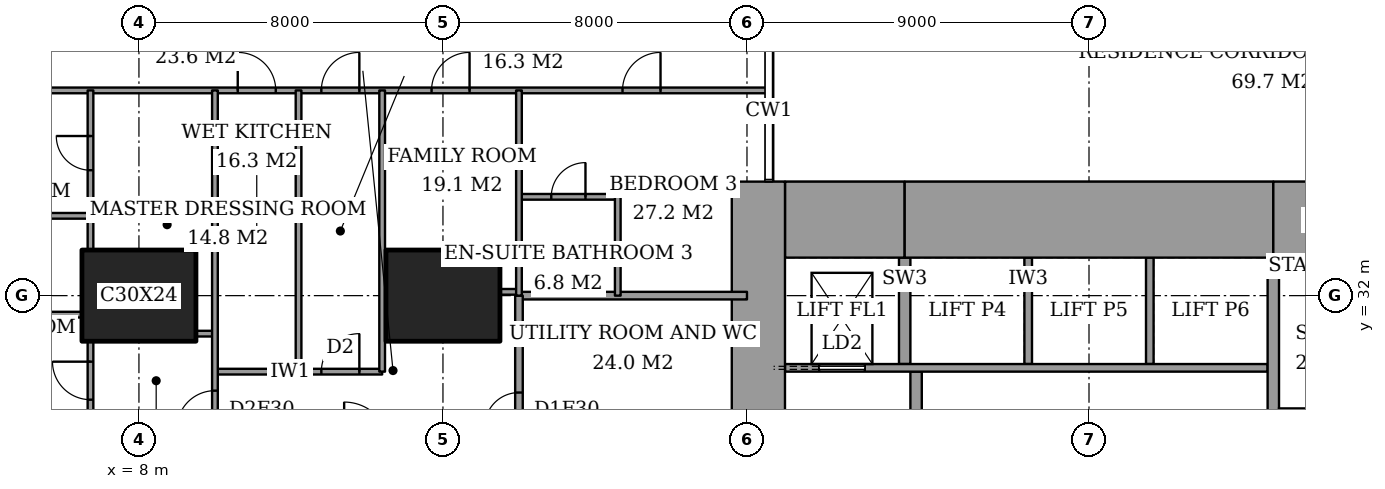
"""IFC4 building model, lengths in metres.
Left out: names, types, materials, properties, quantities, classifications, styles, units other than length and angle.
Written with IfcOpenShell. Run it as: python <this file> out.ifc"""

import sys

from ifc_helpers import new_model, si_unit, direction, frame, frame_2d, origin, origin_2d, place, context, subcontext, project, spatial, rectangle, extrude, element, fill, save


model = new_model("IFC4")
c1 = context("Model", 3, precision=1e-05, world=origin(), true_north=direction((0.0, 1.0)))
c2 = subcontext(c1, "Body", "Model", "MODEL_VIEW")
j1 = project(units=[si_unit("LENGTHUNIT", "METRE"), si_unit("PLANEANGLEUNIT", "RADIAN")], contexts=[c1])
p1 = place(None, origin())
s1 = spatial("IfcSite", under=j1, at=p1, CompositionType="ELEMENT")
p2 = place(p1, origin())
s2 = spatial("IfcBuilding", under=s1, at=p2, CompositionType="ELEMENT")
p3 = place(p2, frame((0.0, 0.0, 157.4)))
s3 = spatial("IfcBuildingStorey", under=s2, at=p3, CompositionType="ELEMENT", Elevation=157.4)
for number, where, z_axis, x_axis in (
    (1, (8.0, 32.0, 0.0), (0.0, 0.0, 1.0), (1.0, 0.0, 0.0)),
    (2, (16.0, 32.0, 0.0), (0.0, 0.0, 1.0), (1.0, 0.0, 0.0)),
):
    element("IfcColumn", number, at=place(p3, frame(where, z_axis=z_axis, x_axis=x_axis)), inside=s3, PredefinedType="COLUMN", context=c2, shape_type="SweptSolid", body=[
        extrude(rectangle(XDim=3.0, YDim=2.4, at=origin_2d()), origin(), (0.0, 0.0, 1.0), 3.6),
    ])
p4 = place(p3, frame((25.0, 34.0, 0.0), z_axis=(0.0, 0.0, 1.0), x_axis=(1.0, 0.0, 0.0)))
e3 = element("IfcWall", 3, at=p4, inside=s3, PredefinedType="SHEAR", context=c2, shape_type="SweptSolid", body=[
    extrude(rectangle(XDim=3.15, YDim=2.0, at=frame_2d((1.575, 0.0))), origin(), (0.0, 0.0, 1.0), 3.6),
])
p5 = place(p3, frame((28.15, 34.0, 0.0), z_axis=(0.0, 0.0, 1.0), x_axis=(1.0, 0.0, 0.0)))
e4 = element("IfcWall", 4, at=p5, inside=s3, PredefinedType="SHEAR", context=c2, shape_type="SweptSolid", body=[
    extrude(rectangle(XDim=9.7, YDim=2.0, at=frame_2d((4.85, 0.0))), origin(), (0.0, 0.0, 1.0), 3.6),
])
p6 = place(p3, frame((37.85, 34.0, 0.0), z_axis=(0.0, 0.0, 1.0), x_axis=(1.0, 0.0, 0.0)))
e5 = element("IfcWall", 5, at=p6, inside=s3, PredefinedType="SHEAR", context=c2, shape_type="SweptSolid", body=[
    extrude(rectangle(XDim=3.15, YDim=2.0, at=frame_2d((1.575, 0.0))), origin(), (0.0, 0.0, 1.0), 3.6),
])
p7 = place(p3, frame((24.3, 23.15, 0.0), z_axis=(0.0, 0.0, 1.0), x_axis=(0.0, 1.0, 0.0)))
e6 = element("IfcWall", 6, at=p7, inside=s3, PredefinedType="SHEAR", context=c2, shape_type="SweptSolid", body=[
    extrude(rectangle(XDim=11.85, YDim=1.4, at=frame_2d((5.925, 0.0))), origin(), (0.0, 0.0, 1.0), 3.6),
])
p8 = place(p7, frame((0.75, 0.0, 0.0)))
e7 = element("IfcOpeningElement", 7, at=p8, cuts=e6, PredefinedType="OPENING", context=c2, shape_type="SweptSolid", body=[
    extrude(rectangle(XDim=1.8, YDim=2.4, at=frame_2d((0.9, 1.2))), frame((0.0, 0.71, 0.0), z_axis=(0.0, -1.0, 0.0), x_axis=(1.0, 0.0, 0.0)), (0.0, 0.0, 1.0), 1.42),
])
p9 = place(p3, frame((37.85, 24.85, 0.0), z_axis=(0.0, 0.0, 1.0), x_axis=(0.0, 1.0, 0.0)))
e8 = element("IfcWall", 8, at=p9, inside=s3, PredefinedType="SHEAR", context=c2, shape_type="SweptSolid", body=[
    extrude(rectangle(XDim=8.15, YDim=0.3, at=frame_2d((4.075, 0.0))), origin(), (0.0, 0.0, 1.0), 3.6),
])
p10 = place(p3, frame((28.45, 23.3, 0.0), z_axis=(0.0, 0.0, 1.0), x_axis=(0.0, 1.0, 0.0)))
e9 = element("IfcWall", 9, at=p10, inside=s3, PredefinedType="PARTITIONING", context=c2, shape_type="SweptSolid", body=[
    extrude(rectangle(XDim=6.7, YDim=0.3, at=frame_2d((3.35, 0.0))), origin(), (0.0, 0.0, 1.0), 3.6),
])
p11 = place(p10, frame((2.7, 0.0, 0.0)))
e10 = element("IfcOpeningElement", 10, at=p11, cuts=e9, PredefinedType="OPENING", context=c2, shape_type="SweptSolid", body=[
    extrude(rectangle(XDim=1.2, YDim=2.1, at=frame_2d((0.6, 1.05))), frame((0.0, 0.16, 0.0), z_axis=(0.0, -1.0, 0.0), x_axis=(1.0, 0.0, 0.0)), (0.0, 0.0, 1.0), 0.32),
])
p12 = place(p3, frame((10.0, 30.0, 0.0), z_axis=(0.0, 0.0, 1.0), x_axis=(1.0, 0.0, 0.0)))
e11 = element("IfcWall", 11, at=p12, inside=s3, PredefinedType="PARTITIONING", context=c2, shape_type="SweptSolid", body=[
    extrude(rectangle(XDim=4.4, YDim=0.15, at=frame_2d((2.2, 0.0))), origin(), (0.0, 0.0, 1.0), 3.35),
])
p13 = place(p12, frame((2.8, 0.0, 0.0)))
e12 = element("IfcOpeningElement", 12, at=p13, cuts=e11, PredefinedType="OPENING", context=c2, shape_type="SweptSolid", body=[
    extrude(rectangle(XDim=1.0, YDim=2.1, at=frame_2d((0.5, 1.05))), frame((0.0, 0.085, 0.0), z_axis=(0.0, -1.0, 0.0), x_axis=(1.0, 0.0, 0.0)), (0.0, 0.0, 1.0), 0.17),
])
p14 = place(p3, frame((9.5, 31.0, 0.0), z_axis=(0.0, 0.0, 1.0), x_axis=(1.0, 0.0, 0.0)))
e13 = element("IfcWall", 13, at=p14, inside=s3, PredefinedType="PARTITIONING", context=c2, shape_type="SweptSolid", body=[
    extrude(rectangle(XDim=0.5, YDim=0.15, at=frame_2d((0.25, 0.0))), origin(), (0.0, 0.0, 1.0), 3.35),
])
p15 = place(p3, frame((1.35, 31.5, 0.0), z_axis=(0.0, 0.0, 1.0), x_axis=(1.0, 0.0, 0.0)))
e14 = element("IfcWall", 14, at=p15, inside=s3, PredefinedType="PARTITIONING", context=c2, shape_type="SweptSolid", body=[
    extrude(rectangle(XDim=5.15, YDim=0.15, at=frame_2d((2.575, 0.0))), origin(), (0.0, 0.0, 1.0), 3.35),
])
p16 = place(p3, frame((18.0, 32.0, 0.0), z_axis=(0.0, 0.0, 1.0), x_axis=(1.0, 0.0, 0.0)))
e15 = element("IfcWall", 15, at=p16, inside=s3, PredefinedType="PARTITIONING", context=c2, shape_type="SweptSolid", body=[
    extrude(rectangle(XDim=6.0, YDim=0.2, at=frame_2d((3.0, 0.0))), origin(), (0.0, 0.0, 1.0), 2.634),
])
p17 = place(p3, frame((17.5, 32.1, 0.0), z_axis=(0.0, 0.0, 1.0), x_axis=(1.0, 0.0, 0.0)))
e16 = element("IfcWall", 16, at=p17, inside=s3, PredefinedType="PARTITIONING", context=c2, shape_type="SweptSolid", body=[
    extrude(rectangle(XDim=0.5, YDim=0.15, at=frame_2d((0.25, 0.0))), origin(), (0.0, 0.0, 1.0), 2.634),
])
p18 = place(p3, frame((4.325, 34.1, 0.0), z_axis=(0.0, 0.0, 1.0), x_axis=(1.0, 0.0, 0.0)))
e17 = element("IfcWall", 17, at=p18, inside=s3, PredefinedType="PARTITIONING", context=c2, shape_type="SweptSolid", body=[
    extrude(rectangle(XDim=2.4, YDim=0.15, at=frame_2d((1.2, 0.0))), origin(), (0.0, 0.0, 1.0), 3.35),
])
p19 = place(p3, frame((18.0, 34.6, 0.0), z_axis=(0.0, 0.0, 1.0), x_axis=(1.0, 0.0, 0.0)))
e18 = element("IfcWall", 18, at=p19, inside=s3, PredefinedType="PARTITIONING", context=c2, shape_type="SweptSolid", body=[
    extrude(rectangle(XDim=2.6, YDim=0.15, at=frame_2d((1.3, 0.0))), origin(), (0.0, 0.0, 1.0), 3.35),
])
p20 = place(p19, frame((0.85, 0.0, 0.0)))
e19 = element("IfcOpeningElement", 19, at=p20, cuts=e18, PredefinedType="OPENING", context=c2, shape_type="SweptSolid", body=[
    extrude(rectangle(XDim=0.9, YDim=2.1, at=frame_2d((0.45, 1.05))), frame((0.0, 0.085, 0.0), z_axis=(0.0, -1.0, 0.0), x_axis=(1.0, 0.0, 0.0)), (0.0, 0.0, 1.0), 0.17),
])
p21 = place(p3, frame((-0.45, 37.4, 0.0), z_axis=(0.0, 0.0, 1.0), x_axis=(1.0, 0.0, 0.0)))
e20 = element("IfcWall", 20, at=p21, inside=s3, PredefinedType="PARTITIONING", context=c2, shape_type="SweptSolid", body=[
    extrude(rectangle(XDim=25.011, YDim=0.15, at=frame_2d((12.505, 0.0))), origin(), (0.0, 0.0, 1.0), 3.35),
])
p22 = place(p21, frame((13.25, 0.0, 0.0)))
e21 = element("IfcOpeningElement", 21, at=p22, cuts=e20, PredefinedType="OPENING", context=c2, shape_type="SweptSolid", body=[
    extrude(rectangle(XDim=1.0, YDim=2.1, at=frame_2d((0.5, 1.05))), frame((0.0, 0.085, 0.0), z_axis=(0.0, -1.0, 0.0), x_axis=(1.0, 0.0, 0.0)), (0.0, 0.0, 1.0), 0.17),
])
p23 = place(p21, frame((3.087, 0.0, 0.0)))
e22 = element("IfcOpeningElement", 22, at=p23, cuts=e20, PredefinedType="OPENING", context=c2, shape_type="SweptSolid", body=[
    extrude(rectangle(XDim=1.0, YDim=2.1, at=frame_2d((0.5, 1.05))), frame((0.0, 0.085, 0.0), z_axis=(0.0, -1.0, 0.0), x_axis=(1.0, 0.0, 0.0)), (0.0, 0.0, 1.0), 0.17),
])
p24 = place(p21, frame((11.05, 0.0, 0.0)))
e23 = element("IfcOpeningElement", 23, at=p24, cuts=e20, PredefinedType="OPENING", context=c2, shape_type="SweptSolid", body=[
    extrude(rectangle(XDim=1.0, YDim=2.1, at=frame_2d((0.5, 1.05))), frame((0.0, 0.085, 0.0), z_axis=(0.0, -1.0, 0.0), x_axis=(1.0, 0.0, 0.0)), (0.0, 0.0, 1.0), 0.17),
])
p25 = place(p21, frame((16.15, 0.0, 0.0)))
e24 = element("IfcOpeningElement", 24, at=p25, cuts=e20, PredefinedType="OPENING", context=c2, shape_type="SweptSolid", body=[
    extrude(rectangle(XDim=1.0, YDim=2.1, at=frame_2d((0.5, 1.05))), frame((0.0, 0.085, 0.0), z_axis=(0.0, -1.0, 0.0), x_axis=(1.0, 0.0, 0.0)), (0.0, 0.0, 1.0), 0.17),
])
p26 = place(p21, frame((21.175, 0.0, 0.0)))
e25 = element("IfcOpeningElement", 25, at=p26, cuts=e20, PredefinedType="OPENING", context=c2, shape_type="SweptSolid", body=[
    extrude(rectangle(XDim=1.0, YDim=2.1, at=frame_2d((0.5, 1.05))), frame((0.0, 0.085, 0.0), z_axis=(0.0, -1.0, 0.0), x_axis=(1.0, 0.0, 0.0)), (0.0, 0.0, 1.0), 0.17),
])
p27 = place(p3, frame((6.725, 28.35, 0.0), z_axis=(0.0, 0.0, 1.0), x_axis=(0.0, 1.0, 0.0)))
e26 = element("IfcWall", 26, at=p27, inside=s3, PredefinedType="PARTITIONING", context=c2, shape_type="SweptSolid", body=[
    extrude(rectangle(XDim=2.45, YDim=0.15, at=frame_2d((1.225, 0.0))), origin(), (0.0, 0.0, 1.0), 3.35),
])
p28 = place(p27, frame((0.913, 0.0, 0.0)))
e27 = element("IfcOpeningElement", 27, at=p28, cuts=e26, PredefinedType="OPENING", context=c2, shape_type="SweptSolid", body=[
    extrude(rectangle(XDim=1.0, YDim=2.1, at=frame_2d((0.5, 1.05))), frame((0.0, 0.085, 0.0), z_axis=(0.0, -1.0, 0.0), x_axis=(1.0, 0.0, 0.0)), (0.0, 0.0, 1.0), 0.17),
])
p29 = place(p3, frame((6.725, 33.2, 0.0), z_axis=(0.0, 0.0, 1.0), x_axis=(0.0, 1.0, 0.0)))
e28 = element("IfcWall", 28, at=p29, inside=s3, PredefinedType="PARTITIONING", context=c2, shape_type="SweptSolid", body=[
    extrude(rectangle(XDim=4.2, YDim=0.15, at=frame_2d((2.1, 0.0))), origin(), (0.0, 0.0, 1.0), 3.35),
])
p30 = place(p29, frame((2.1, 0.0, 0.0)))
e29 = element("IfcOpeningElement", 29, at=p30, cuts=e28, PredefinedType="OPENING", context=c2, shape_type="SweptSolid", body=[
    extrude(rectangle(XDim=0.9, YDim=2.1, at=frame_2d((0.45, 1.05))), frame((0.0, 0.085, 0.0), z_axis=(0.0, -1.0, 0.0), x_axis=(1.0, 0.0, 0.0)), (0.0, 0.0, 1.0), 0.17),
])
p31 = place(p3, frame((10.0, 28.0, 0.0), z_axis=(0.0, 0.0, 1.0), x_axis=(0.0, 1.0, 0.0)))
e30 = element("IfcWall", 30, at=p31, inside=s3, PredefinedType="PARTITIONING", context=c2, shape_type="SweptSolid", body=[
    extrude(rectangle(XDim=9.4, YDim=0.15, at=frame_2d((4.7, 0.0))), origin(), (0.0, 0.0, 1.0), 3.35),
])
p32 = place(p31, frame((0.5, 0.0, 0.0)))
e31 = element("IfcOpeningElement", 31, at=p32, cuts=e30, PredefinedType="OPENING", context=c2, shape_type="SweptSolid", body=[
    extrude(rectangle(XDim=1.0, YDim=2.1, at=frame_2d((0.5, 1.05))), frame((0.0, 0.085, 0.0), z_axis=(0.0, -1.0, 0.0), x_axis=(1.0, 0.0, 0.0)), (0.0, 0.0, 1.0), 0.17),
])
for number, where, z_axis, x_axis in (
    (32, (12.2, 30.0, 0.0), (0.0, 0.0, 1.0), (0.0, 1.0, 0.0)),
    (33, (14.4, 30.0, 0.0), (0.0, 0.0, 1.0), (0.0, 1.0, 0.0)),
):
    element("IfcWall", number, at=place(p3, frame(where, z_axis=z_axis, x_axis=x_axis)), inside=s3, PredefinedType="PARTITIONING", context=c2, shape_type="SweptSolid", body=[
        extrude(rectangle(XDim=7.4, YDim=0.15, at=frame_2d((3.7, 0.0))), origin(), (0.0, 0.0, 1.0), 3.35),
    ])
p33 = place(p3, frame((18.0, 28.0, 0.0), z_axis=(0.0, 0.0, 1.0), x_axis=(0.0, 1.0, 0.0)))
e34 = element("IfcWall", 34, at=p33, inside=s3, PredefinedType="PARTITIONING", context=c2, shape_type="SweptSolid", body=[
    extrude(rectangle(XDim=4.0, YDim=0.2, at=frame_2d((2.0, 0.0))), origin(), (0.0, 0.0, 1.0), 3.35),
])
p34 = place(p33, frame((0.55, 0.0, 0.0)))
e35 = element("IfcOpeningElement", 35, at=p34, cuts=e34, PredefinedType="OPENING", context=c2, shape_type="SweptSolid", body=[
    extrude(rectangle(XDim=0.9, YDim=2.1, at=frame_2d((0.45, 1.05))), frame((0.0, 0.11, 0.0), z_axis=(0.0, -1.0, 0.0), x_axis=(1.0, 0.0, 0.0)), (0.0, 0.0, 1.0), 0.22),
])
p35 = place(p3, frame((18.0, 32.0, 0.0), z_axis=(0.0, 0.0, 1.0), x_axis=(0.0, 1.0, 0.0)))
e36 = element("IfcWall", 36, at=p35, inside=s3, PredefinedType="PARTITIONING", context=c2, shape_type="SweptSolid", body=[
    extrude(rectangle(XDim=5.4, YDim=0.15, at=frame_2d((2.7, 0.0))), origin(), (0.0, 0.0, 1.0), 3.35),
])
p36 = place(p3, frame((20.6, 32.0, 0.0), z_axis=(0.0, 0.0, 1.0), x_axis=(0.0, 1.0, 0.0)))
e37 = element("IfcWall", 37, at=p36, inside=s3, PredefinedType="PARTITIONING", context=c2, shape_type="SweptSolid", body=[
    extrude(rectangle(XDim=2.6, YDim=0.15, at=frame_2d((1.3, 0.0))), origin(), (0.0, 0.0, 1.0), 3.35),
])
p37 = place(p3, frame((25.0, 30.1, 0.0), z_axis=(0.0, 0.0, 1.0), x_axis=(1.0, 0.0, 0.0)))
e38 = element("IfcWall", 38, at=p37, inside=s3, PredefinedType="PARTITIONING", context=c2, shape_type="SweptSolid", body=[
    extrude(rectangle(XDim=12.7, YDim=0.2, at=frame_2d((6.35, 0.0))), origin(), (0.0, 0.0, 1.0), 3.6),
])
p38 = place(p37, frame((0.9, 0.0, 0.0)))
e39 = element("IfcOpeningElement", 39, at=p38, cuts=e38, PredefinedType="OPENING", context=c2, shape_type="SweptSolid", body=[
    extrude(rectangle(XDim=1.2, YDim=2.1, at=frame_2d((0.6, 1.05))), frame((0.0, 0.11, 0.0), z_axis=(0.0, -1.0, 0.0), x_axis=(1.0, 0.0, 0.0)), (0.0, 0.0, 1.0), 0.22),
])
for number, where, z_axis, x_axis in (
    (40, (31.4, 30.2, 0.0), (0.0, 0.0, 1.0), (0.0, 1.0, 0.0)),
    (41, (34.6, 30.2, 0.0), (0.0, 0.0, 1.0), (0.0, 1.0, 0.0)),
):
    element("IfcWall", number, at=place(p3, frame(where, z_axis=z_axis, x_axis=x_axis)), inside=s3, PredefinedType="PARTITIONING", context=c2, shape_type="SweptSolid", body=[
        extrude(rectangle(XDim=2.8, YDim=0.2, at=frame_2d((1.4, 0.0))), origin(), (0.0, 0.0, 1.0), 3.6),
    ])
p39 = place(p3, frame((28.15, 30.2, 0.0), z_axis=(0.0, 0.0, 1.0), x_axis=(0.0, 1.0, 0.0)))
e42 = element("IfcWall", 42, at=p39, inside=s3, PredefinedType="SHEAR", context=c2, shape_type="SweptSolid", body=[
    extrude(rectangle(XDim=2.8, YDim=0.3, at=frame_2d((1.4, 0.0))), origin(), (0.0, 0.0, 1.0), 3.6),
])
p40 = place(p22, origin())
e43 = element("IfcDoor", 43, at=p40, inside=s3, OperationType="SINGLE_SWING_LEFT", PredefinedType="DOOR", context=c2, shape_type="SweptSolid", body=[
    extrude(rectangle(XDim=1.0, YDim=2.1, at=frame_2d((0.5, 1.05))), frame((0.0, 0.025, 0.0), z_axis=(0.0, -1.0, 0.0), x_axis=(1.0, 0.0, 0.0)), (0.0, 0.0, 1.0), 0.05),
])
fill(e21, e43)
p41 = place(p28, origin())
e44 = element("IfcDoor", 44, at=p41, inside=s3, OperationType="SINGLE_SWING_LEFT", PredefinedType="DOOR", context=c2, shape_type="SweptSolid", body=[
    extrude(rectangle(XDim=1.0, YDim=2.1, at=frame_2d((0.5, 1.05))), frame((0.0, 0.025, 0.0), z_axis=(0.0, -1.0, 0.0), x_axis=(1.0, 0.0, 0.0)), (0.0, 0.0, 1.0), 0.05),
])
fill(e27, e44)
p42 = place(p30, origin())
e45 = element("IfcDoor", 45, at=p42, inside=s3, OperationType="SINGLE_SWING_LEFT", PredefinedType="DOOR", context=c2, shape_type="SweptSolid", body=[
    extrude(rectangle(XDim=0.9, YDim=2.1, at=frame_2d((0.45, 1.05))), frame((0.0, 0.025, 0.0), z_axis=(0.0, -1.0, 0.0), x_axis=(1.0, 0.0, 0.0)), (0.0, 0.0, 1.0), 0.05),
])
fill(e29, e45)
p43 = place(p32, origin())
e46 = element("IfcDoor", 46, at=p43, inside=s3, OperationType="SINGLE_SWING_RIGHT", PredefinedType="DOOR", context=c2, shape_type="SweptSolid", body=[
    extrude(rectangle(XDim=1.0, YDim=2.1, at=frame_2d((0.5, 1.05))), frame((0.0, 0.025, 0.0), z_axis=(0.0, -1.0, 0.0), x_axis=(1.0, 0.0, 0.0)), (0.0, 0.0, 1.0), 0.05),
])
fill(e31, e46)
p44 = place(p24, origin())
e47 = element("IfcDoor", 47, at=p44, inside=s3, OperationType="SINGLE_SWING_RIGHT", PredefinedType="DOOR", context=c2, shape_type="SweptSolid", body=[
    extrude(rectangle(XDim=1.0, YDim=2.1, at=frame_2d((0.5, 1.05))), frame((0.0, 0.025, 0.0), z_axis=(0.0, -1.0, 0.0), x_axis=(1.0, 0.0, 0.0)), (0.0, 0.0, 1.0), 0.05),
])
fill(e23, e47)
p45 = place(p13, origin())
e48 = element("IfcDoor", 48, at=p45, inside=s3, OperationType="SINGLE_SWING_LEFT", PredefinedType="DOOR", context=c2, shape_type="SweptSolid", body=[
    extrude(rectangle(XDim=1.0, YDim=2.1, at=frame_2d((0.5, 1.05))), frame((0.0, 0.025, 0.0), z_axis=(0.0, -1.0, 0.0), x_axis=(1.0, 0.0, 0.0)), (0.0, 0.0, 1.0), 0.05),
])
fill(e12, e48)
p46 = place(p25, origin())
e49 = element("IfcDoor", 49, at=p46, inside=s3, OperationType="SINGLE_SWING_LEFT", PredefinedType="DOOR", context=c2, shape_type="SweptSolid", body=[
    extrude(rectangle(XDim=1.0, YDim=2.1, at=frame_2d((0.5, 1.05))), frame((0.0, 0.025, 0.0), z_axis=(0.0, -1.0, 0.0), x_axis=(1.0, 0.0, 0.0)), (0.0, 0.0, 1.0), 0.05),
])
fill(e24, e49)
p47 = place(p20, origin())
e50 = element("IfcDoor", 50, at=p47, inside=s3, OperationType="SINGLE_SWING_LEFT", PredefinedType="DOOR", context=c2, shape_type="SweptSolid", body=[
    extrude(rectangle(XDim=0.9, YDim=2.1, at=frame_2d((0.45, 1.05))), frame((0.0, 0.025, 0.0), z_axis=(0.0, -1.0, 0.0), x_axis=(1.0, 0.0, 0.0)), (0.0, 0.0, 1.0), 0.05),
])
fill(e19, e50)
p48 = place(p26, origin())
e51 = element("IfcDoor", 51, at=p48, inside=s3, OperationType="SINGLE_SWING_LEFT", PredefinedType="DOOR", context=c2, shape_type="SweptSolid", body=[
    extrude(rectangle(XDim=1.0, YDim=2.1, at=frame_2d((0.5, 1.05))), frame((0.0, 0.025, 0.0), z_axis=(0.0, -1.0, 0.0), x_axis=(1.0, 0.0, 0.0)), (0.0, 0.0, 1.0), 0.05),
])
fill(e25, e51)
p49 = place(p34, origin())
e52 = element("IfcDoor", 52, at=p49, inside=s3, OperationType="SINGLE_SWING_RIGHT", PredefinedType="DOOR", context=c2, shape_type="SweptSolid", body=[
    extrude(rectangle(XDim=0.9, YDim=2.1, at=frame_2d((0.45, 1.05))), frame((0.0, 0.025, 0.0), z_axis=(0.0, -1.0, 0.0), x_axis=(1.0, 0.0, 0.0)), (0.0, 0.0, 1.0), 0.05),
])
fill(e35, e52)
p50 = place(p38, origin())
e53 = element("IfcDoor", 53, at=p50, inside=s3, OperationType="SLIDING_TO_LEFT", PredefinedType="DOOR", context=c2, shape_type="SweptSolid", body=[
    extrude(rectangle(XDim=1.2, YDim=2.1, at=frame_2d((0.6, 1.05))), frame((0.0, 0.025, 0.0), z_axis=(0.0, -1.0, 0.0), x_axis=(1.0, 0.0, 0.0)), (0.0, 0.0, 1.0), 0.05),
])
fill(e39, e53)
save(model, sys.argv[1])
